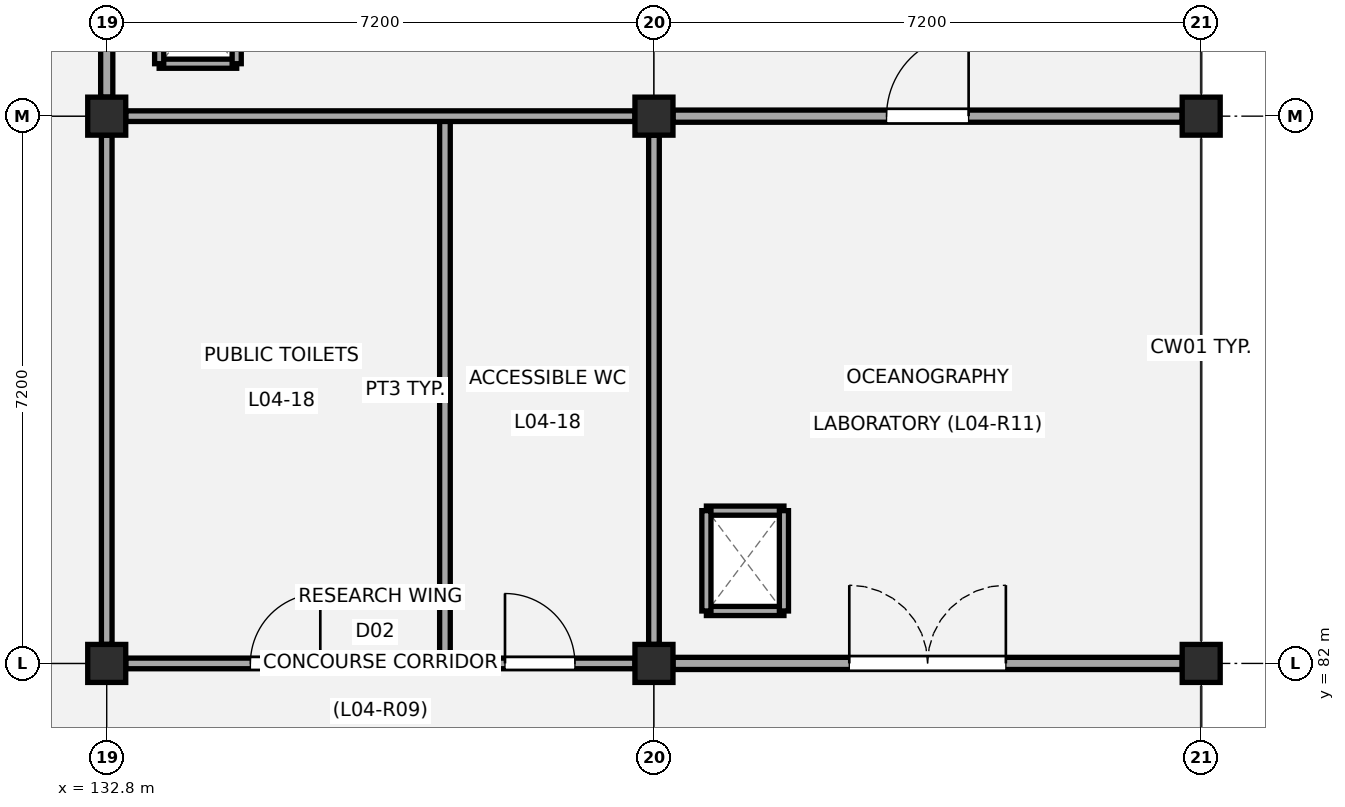
"""IFC4 building model, lengths in metres.
Left out: names, types, materials, properties, quantities, classifications, styles, units other than length and angle.
Written with IfcOpenShell. Run it as: python <this file> out.ifc"""

import sys

from ifc_helpers import new_model, si_unit, direction, frame, frame_2d, origin, origin_2d, place, context, subcontext, project, spatial, rectangle, extrude, element, fill, save


model = new_model("IFC4")
c1 = context("Model", 3, precision=1e-05, world=origin(), true_north=direction((0.0, 1.0)))
c2 = subcontext(c1, "Body", "Model", "MODEL_VIEW")
j1 = project(units=[si_unit("LENGTHUNIT", "METRE"), si_unit("PLANEANGLEUNIT", "RADIAN")], contexts=[c1])
p1 = place(None, origin())
s1 = spatial("IfcSite", under=j1, at=p1, CompositionType="ELEMENT")
p2 = place(p1, origin())
s2 = spatial("IfcBuilding", under=s1, at=p2, CompositionType="ELEMENT")
p3 = place(p2, frame((0.0, 0.0, 17.64)))
s3 = spatial("IfcBuildingStorey", under=s2, at=p3, CompositionType="ELEMENT", Elevation=17.64)
for number, where, z_axis, x_axis in (
    (1, (132.8, 82.0, 0.0), (0.0, 0.0, 1.0), (1.0, 0.0, 0.0)),
    (2, (132.8, 89.2, 0.0), (0.0, 0.0, 1.0), (1.0, 0.0, 0.0)),
    (3, (140.0, 82.0, 0.0), (0.0, 0.0, 1.0), (1.0, 0.0, 0.0)),
    (4, (140.0, 89.2, 0.0), (0.0, 0.0, 1.0), (1.0, 0.0, 0.0)),
    (5, (147.2, 82.0, 0.0), (0.0, 0.0, 1.0), (1.0, 0.0, 0.0)),
    (6, (147.2, 89.2, 0.0), (0.0, 0.0, 1.0), (1.0, 0.0, 0.0)),
):
    element("IfcColumn", number, at=place(p3, frame(where, z_axis=z_axis, x_axis=x_axis)), inside=s3, PredefinedType="COLUMN", context=c2, shape_type="SweptSolid", body=[
        extrude(rectangle(XDim=0.5, YDim=0.5, at=origin_2d()), origin(), (0.0, 0.0, 1.0), 3.96),
    ])
p4 = place(p3, frame((133.49, 89.89, 0.0), z_axis=(0.0, 0.0, 1.0), x_axis=(1.0, 0.0, 0.0)))
e7 = element("IfcWall", 7, at=p4, inside=s3, PredefinedType="PARTITIONING", context=c2, shape_type="SweptSolid", body=[
    extrude(rectangle(XDim=1.02, YDim=0.12, at=frame_2d((0.51, 0.0))), origin(), (0.0, 0.0, 1.0), 3.66),
])
for number, where, z_axis, x_axis in (
    (8, (133.49, 89.89, 0.0), (0.0, 0.0, 1.0), (0.0, 1.0, 0.0)),
    (9, (134.51, 89.89, 0.0), (0.0, 0.0, 1.0), (0.0, 1.0, 0.0)),
):
    element("IfcWall", number, at=place(p3, frame(where, z_axis=z_axis, x_axis=x_axis)), inside=s3, PredefinedType="PARTITIONING", context=c2, shape_type="SweptSolid", body=[
        extrude(rectangle(XDim=1.32, YDim=0.12, at=frame_2d((0.66, 0.0))), origin(), (0.0, 0.0, 1.0), 3.66),
    ])
for number, where, z_axis, x_axis in (
    (10, (140.69, 82.69, 0.0), (0.0, 0.0, 1.0), (1.0, 0.0, 0.0)),
    (11, (140.69, 84.01, 0.0), (0.0, 0.0, 1.0), (1.0, 0.0, 0.0)),
):
    element("IfcWall", number, at=place(p3, frame(where, z_axis=z_axis, x_axis=x_axis)), inside=s3, PredefinedType="PARTITIONING", context=c2, shape_type="SweptSolid", body=[
        extrude(rectangle(XDim=1.02, YDim=0.12, at=frame_2d((0.51, 0.0))), origin(), (0.0, 0.0, 1.0), 3.68),
    ])
for number, where, z_axis, x_axis in (
    (12, (140.69, 82.69, 0.0), (0.0, 0.0, 1.0), (0.0, 1.0, 0.0)),
    (13, (141.71, 82.69, 0.0), (0.0, 0.0, 1.0), (0.0, 1.0, 0.0)),
):
    element("IfcWall", number, at=place(p3, frame(where, z_axis=z_axis, x_axis=x_axis)), inside=s3, PredefinedType="PARTITIONING", context=c2, shape_type="SweptSolid", body=[
        extrude(rectangle(XDim=1.32, YDim=0.12, at=frame_2d((0.66, 0.0))), origin(), (0.0, 0.0, 1.0), 3.68),
    ])
p5 = place(p3, frame((137.25, 82.0, 0.0), z_axis=(0.0, 0.0, 1.0), x_axis=(0.0, 1.0, 0.0)))
e14 = element("IfcWall", 14, at=p5, inside=s3, PredefinedType="PARTITIONING", context=c2, shape_type="SweptSolid", body=[
    extrude(rectangle(XDim=7.2, YDim=0.14, at=frame_2d((3.6, 0.0))), origin(), (0.0, 0.0, 1.0), 3.1),
])
p6 = place(p3, frame((133.05, 82.0, 0.0), z_axis=(0.0, 0.0, 1.0), x_axis=(1.0, 0.0, 0.0)))
e15 = element("IfcWall", 15, at=p6, inside=s3, PredefinedType="PARTITIONING", context=c2, shape_type="SweptSolid", body=[
    extrude(rectangle(XDim=4.2, YDim=0.14, at=frame_2d((2.1, 0.0))), origin(), (0.0, 0.0, 1.0), 3.07),
])
p7 = place(p6, frame((1.64, 0.0, 0.0)))
e16 = element("IfcOpeningElement", 16, at=p7, cuts=e15, PredefinedType="OPENING", context=c2, shape_type="SweptSolid", body=[
    extrude(rectangle(XDim=0.92, YDim=2.08, at=frame_2d((0.46, 1.04))), frame((0.0, 0.08, 0.0), z_axis=(0.0, -1.0, 0.0), x_axis=(1.0, 0.0, 0.0)), (0.0, 0.0, 1.0), 0.16),
])
p8 = place(p3, frame((137.25, 82.0, 0.0), z_axis=(0.0, 0.0, 1.0), x_axis=(1.0, 0.0, 0.0)))
e17 = element("IfcWall", 17, at=p8, inside=s3, PredefinedType="PARTITIONING", context=c2, shape_type="SweptSolid", body=[
    extrude(rectangle(XDim=2.5, YDim=0.14, at=frame_2d((1.25, 0.0))), origin(), (0.0, 0.0, 1.0), 3.07),
])
p9 = place(p8, frame((0.79, 0.0, 0.0)))
e18 = element("IfcOpeningElement", 18, at=p9, cuts=e17, PredefinedType="OPENING", context=c2, shape_type="SweptSolid", body=[
    extrude(rectangle(XDim=0.92, YDim=2.08, at=frame_2d((0.46, 1.04))), frame((0.0, 0.08, 0.0), z_axis=(0.0, -1.0, 0.0), x_axis=(1.0, 0.0, 0.0)), (0.0, 0.0, 1.0), 0.16),
])
p10 = place(p3, frame((133.05, 89.2, 0.0), z_axis=(0.0, 0.0, 1.0), x_axis=(1.0, 0.0, 0.0)))
e19 = element("IfcWall", 19, at=p10, inside=s3, PredefinedType="PARTITIONING", context=c2, shape_type="SweptSolid", body=[
    extrude(rectangle(XDim=6.7, YDim=0.14, at=frame_2d((3.35, 0.0))), origin(), (0.0, 0.0, 1.0), 3.02),
])
for number, where, z_axis, x_axis in (
    (20, (132.8, 82.25, 0.0), (0.0, 0.0, 1.0), (0.0, 1.0, 0.0)),
    (21, (140.0, 82.25, 0.0), (0.0, 0.0, 1.0), (0.0, 1.0, 0.0)),
):
    element("IfcWall", number, at=place(p3, frame(where, z_axis=z_axis, x_axis=x_axis)), inside=s3, PredefinedType="PARTITIONING", context=c2, shape_type="SweptSolid", body=[
        extrude(rectangle(XDim=6.7, YDim=0.14, at=frame_2d((3.35, 0.0))), origin(), (0.0, 0.0, 1.0), 3.07),
    ])
p11 = place(p3, frame((132.8, 89.45, 0.0), z_axis=(0.0, 0.0, 1.0), x_axis=(0.0, 1.0, 0.0)))
e22 = element("IfcWall", 22, at=p11, inside=s3, PredefinedType="PARTITIONING", context=c2, shape_type="SweptSolid", body=[
    extrude(rectangle(XDim=6.7, YDim=0.16, at=frame_2d((3.35, 0.0))), origin(), (0.0, 0.0, 1.0), 3.02),
])
p12 = place(p3, frame((140.25, 82.0, 0.0), z_axis=(0.0, 0.0, 1.0), x_axis=(1.0, 0.0, 0.0)))
e23 = element("IfcWall", 23, at=p12, inside=s3, PredefinedType="PARTITIONING", context=c2, shape_type="SweptSolid", body=[
    extrude(rectangle(XDim=6.7, YDim=0.16, at=frame_2d((3.35, 0.0))), origin(), (0.0, 0.0, 1.0), 3.04),
])
p13 = place(p12, frame((2.32, 0.0, 0.0)))
e24 = element("IfcOpeningElement", 24, at=p13, cuts=e23, PredefinedType="OPENING", context=c2, shape_type="SweptSolid", body=[
    extrude(rectangle(XDim=2.06, YDim=2.28, at=frame_2d((1.03, 1.14))), frame((0.0, 0.09, 0.0), z_axis=(0.0, -1.0, 0.0), x_axis=(1.0, 0.0, 0.0)), (0.0, 0.0, 1.0), 0.18),
])
p14 = place(p3, frame((140.25, 89.2, 0.0), z_axis=(0.0, 0.0, 1.0), x_axis=(1.0, 0.0, 0.0)))
e25 = element("IfcWall", 25, at=p14, inside=s3, PredefinedType="PARTITIONING", context=c2, shape_type="SweptSolid", body=[
    extrude(rectangle(XDim=6.7, YDim=0.16, at=frame_2d((3.35, 0.0))), origin(), (0.0, 0.0, 1.0), 3.09),
])
p15 = place(p14, frame((2.81, 0.0, 0.0)))
e26 = element("IfcOpeningElement", 26, at=p15, cuts=e25, PredefinedType="OPENING", context=c2, shape_type="SweptSolid", body=[
    extrude(rectangle(XDim=1.08, YDim=2.16, at=frame_2d((0.54, 1.08))), frame((0.0, 0.09, 0.0), z_axis=(0.0, -1.0, 0.0), x_axis=(1.0, 0.0, 0.0)), (0.0, 0.0, 1.0), 0.18),
])
p16 = place(p7, origin())
e27 = element("IfcDoor", 27, at=p16, inside=s3, OperationType="SINGLE_SWING_RIGHT", PredefinedType="DOOR", context=c2, shape_type="SweptSolid", body=[
    extrude(rectangle(XDim=0.92, YDim=2.08, at=frame_2d((0.46, 1.04))), frame((0.0, 0.025, 0.0), z_axis=(0.0, -1.0, 0.0), x_axis=(1.0, 0.0, 0.0)), (0.0, 0.0, 1.0), 0.05),
])
fill(e16, e27)
p17 = place(p9, origin())
e28 = element("IfcDoor", 28, at=p17, inside=s3, OperationType="SINGLE_SWING_LEFT", PredefinedType="DOOR", context=c2, shape_type="SweptSolid", body=[
    extrude(rectangle(XDim=0.92, YDim=2.08, at=frame_2d((0.46, 1.04))), frame((0.0, 0.025, 0.0), z_axis=(0.0, -1.0, 0.0), x_axis=(1.0, 0.0, 0.0)), (0.0, 0.0, 1.0), 0.05),
])
fill(e18, e28)
p18 = place(p15, origin())
e29 = element("IfcDoor", 29, at=p18, inside=s3, OperationType="SINGLE_SWING_RIGHT", PredefinedType="DOOR", context=c2, shape_type="SweptSolid", body=[
    extrude(rectangle(XDim=1.08, YDim=2.16, at=frame_2d((0.54, 1.08))), frame((0.0, 0.025, 0.0), z_axis=(0.0, -1.0, 0.0), x_axis=(1.0, 0.0, 0.0)), (0.0, 0.0, 1.0), 0.05),
])
fill(e26, e29)
p19 = place(p13, origin())
e30 = element("IfcDoor", 30, at=p19, inside=s3, OperationType="DOUBLE_DOOR_SINGLE_SWING", PredefinedType="DOOR", context=c2, shape_type="SweptSolid", body=[
    extrude(rectangle(XDim=2.06, YDim=2.28, at=frame_2d((1.03, 1.14))), frame((0.0, 0.025, 0.0), z_axis=(0.0, -1.0, 0.0), x_axis=(1.0, 0.0, 0.0)), (0.0, 0.0, 1.0), 0.05),
])
fill(e24, e30)
save(model, sys.argv[1])
